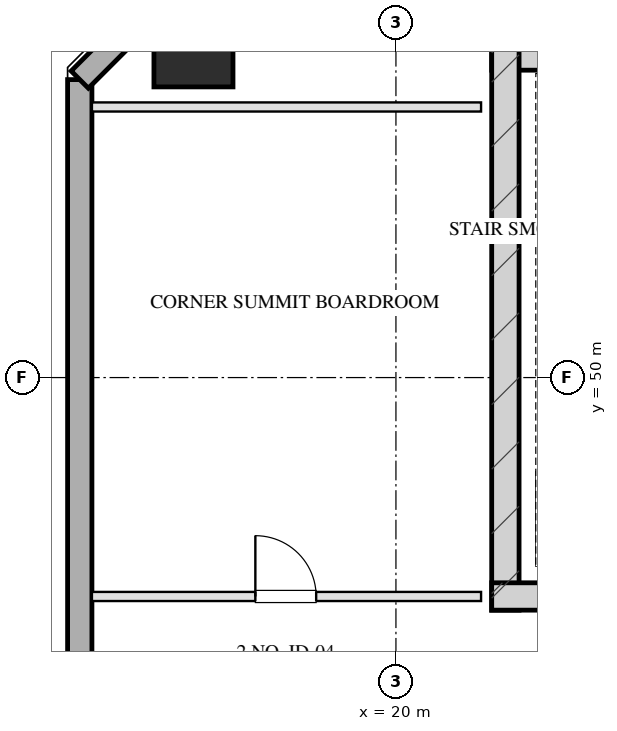
"""IFC4 building model, lengths in metres.
Left out: names, types, materials, properties, quantities, classifications, styles, units other than length and angle.
Written with IfcOpenShell. Run it as: python <this file> out.ifc"""

import sys

from ifc_helpers import new_model, si_unit, direction, frame, frame_2d, origin, origin_2d, place, context, subcontext, project, spatial, rectangle, hollow_rectangle, extrude, element, fill, save


model = new_model("IFC4")
c1 = context("Model", 3, precision=1e-05, world=origin(), true_north=direction((0.0, 1.0)))
c2 = subcontext(c1, "Body", "Model", "MODEL_VIEW")
j1 = project(units=[si_unit("LENGTHUNIT", "METRE"), si_unit("PLANEANGLEUNIT", "RADIAN")], contexts=[c1])
p1 = place(None, origin())
s1 = spatial("IfcSite", under=j1, at=p1, CompositionType="ELEMENT")
p2 = place(p1, origin())
s2 = spatial("IfcBuilding", under=s1, at=p2, CompositionType="ELEMENT")
p3 = place(p2, frame((0.0, 0.0, 276.0)))
s3 = spatial("IfcBuildingStorey", under=s2, at=p3, CompositionType="ELEMENT", Elevation=276.0)
p4 = place(p3, frame((21.575, 55.28, 0.0), z_axis=(0.0, 0.0, 1.0), x_axis=(1.0, 0.0, 0.0)))
e1 = element("IfcWall", 1, at=p4, inside=s3, PredefinedType="SHEAR", context=c2, shape_type="SweptSolid", body=[
    extrude(rectangle(XDim=16.85, YDim=0.45, at=frame_2d((8.425, 0.0))), origin(), (0.0, 0.0, 1.0), 4.2),
])
p5 = place(p3, frame((21.8, 46.175, 0.0), z_axis=(0.0, 0.0, 1.0), x_axis=(0.0, 1.0, 0.0)))
e2 = element("IfcWall", 2, at=p5, inside=s3, PredefinedType="SHEAR", context=c2, shape_type="SweptSolid", body=[
    extrude(rectangle(XDim=9.33, YDim=0.45, at=frame_2d((4.665, 0.0))), origin(), (0.0, 0.0, 1.0), 4.2),
])
p6 = place(p3, frame((21.575, 46.4, 0.0), z_axis=(0.0, 0.0, 1.0), x_axis=(1.0, 0.0, 0.0)))
e3 = element("IfcWall", 3, at=p6, inside=s3, PredefinedType="SHEAR", context=c2, shape_type="SweptSolid", body=[
    extrude(rectangle(XDim=4.145, YDim=0.45, at=frame_2d((2.073, 0.0))), origin(), (0.0, 0.0, 1.0), 4.2),
])
p7 = place(p3, frame((16.67, 55.43, 0.0), z_axis=(0.0, 0.0, 1.0), x_axis=(1.0, 0.0, 0.0)))
e4 = element("IfcColumn", 4, at=p7, inside=s3, PredefinedType="COLUMN", context=c2, shape_type="SweptSolid", body=[
    extrude(hollow_rectangle(XDim=1.3, YDim=1.3, WallThickness=0.045, at=origin_2d()), origin(), (0.0, 0.0, 1.0), 4.201),
])
p8 = place(p3, frame((14.8, 13.1, 0.0), z_axis=(0.0, 0.0, 1.0), x_axis=(0.0, 1.0, 0.0)))
e5 = element("IfcWall", 5, at=p8, inside=s3, PredefinedType="SOLIDWALL", context=c2, shape_type="SweptSolid", body=[
    extrude(rectangle(XDim=41.8, YDim=0.4, at=frame_2d((20.9, 0.0))), origin(), (0.0, 0.0, 1.0), 3.33),
])
p9 = place(p8, frame((22.525, 0.0, 0.75)))
e6 = element("IfcOpeningElement", 6, at=p9, cuts=e5, PredefinedType="OPENING", context=c2, shape_type="SweptSolid", body=[
    extrude(rectangle(XDim=1.95, YDim=1.65, at=frame_2d((0.975, 0.825))), frame((0.0, 0.21, 0.0), z_axis=(0.0, -1.0, 0.0), x_axis=(1.0, 0.0, 0.0)), (0.0, 0.0, 1.0), 0.42),
])
p10 = place(p8, frame((26.325, 0.0, 0.75)))
e7 = element("IfcOpeningElement", 7, at=p10, cuts=e5, PredefinedType="OPENING", context=c2, shape_type="SweptSolid", body=[
    extrude(rectangle(XDim=1.95, YDim=1.65, at=frame_2d((0.975, 0.825))), frame((0.0, 0.21, 0.0), z_axis=(0.0, -1.0, 0.0), x_axis=(1.0, 0.0, 0.0)), (0.0, 0.0, 1.0), 0.42),
])
p11 = place(p8, frame((17.25, 0.0, 0.0)))
e8 = element("IfcOpeningElement", 8, at=p11, cuts=e5, PredefinedType="OPENING", context=c2, shape_type="SweptSolid", body=[
    extrude(rectangle(XDim=1.1, YDim=2.15, at=frame_2d((0.55, 1.075))), frame((0.0, 0.21, 0.0), z_axis=(0.0, -1.0, 0.0), x_axis=(1.0, 0.0, 0.0)), (0.0, 0.0, 1.0), 0.42),
])
p12 = place(p3, frame((14.8, 54.9, 0.0), z_axis=(0.0, 0.0, 1.0), x_axis=(0.707070815327, 0.707142745217, 0.0)))
e9 = element("IfcWall", 9, at=p12, inside=s3, PredefinedType="SOLIDWALL", context=c2, shape_type="SweptSolid", body=[
    extrude(rectangle(XDim=3.394, YDim=0.4, at=frame_2d((1.697, 0.0))), origin(), (0.0, 0.0, 1.0), 3.33),
])
p13 = place(p3, frame((15.0, 54.45, 0.0), z_axis=(0.0, 0.0, 1.0), x_axis=(1.0, 0.0, 0.0)))
e10 = element("IfcWall", 10, at=p13, inside=s3, PredefinedType="PARTITIONING", context=c2, shape_type="SweptSolid", body=[
    extrude(rectangle(XDim=6.4, YDim=0.15, at=frame_2d((3.2, 0.0))), origin(), (0.0, 0.0, 1.0), 3.925),
])
p14 = place(p3, frame((15.0, 46.4, 0.0), z_axis=(0.0, 0.0, 1.0), x_axis=(1.0, 0.0, 0.0)))
e11 = element("IfcWall", 11, at=p14, inside=s3, PredefinedType="PARTITIONING", context=c2, shape_type="SweptSolid", body=[
    extrude(rectangle(XDim=6.4, YDim=0.15, at=frame_2d((3.2, 0.0))), origin(), (0.0, 0.0, 1.0), 3.925),
])
p15 = place(p14, frame((2.688, 0.0, 0.0)))
e12 = element("IfcOpeningElement", 12, at=p15, cuts=e11, PredefinedType="OPENING", context=c2, shape_type="SweptSolid", body=[
    extrude(rectangle(XDim=1.0, YDim=2.05, at=frame_2d((0.5, 1.025))), frame((0.0, 0.085, 0.0), z_axis=(0.0, -1.0, 0.0), x_axis=(1.0, 0.0, 0.0)), (0.0, 0.0, 1.0), 0.17),
])
p16 = place(p15, origin())
e13 = element("IfcDoor", 13, at=p16, inside=s3, OperationType="SINGLE_SWING_LEFT", PredefinedType="DOOR", context=c2, shape_type="SweptSolid", body=[
    extrude(rectangle(XDim=1.0, YDim=2.05, at=frame_2d((0.5, 1.025))), frame((0.0, 0.025, 0.0), z_axis=(0.0, -1.0, 0.0), x_axis=(1.0, 0.0, 0.0)), (0.0, 0.0, 1.0), 0.05),
])
fill(e12, e13)
save(model, sys.argv[1])
